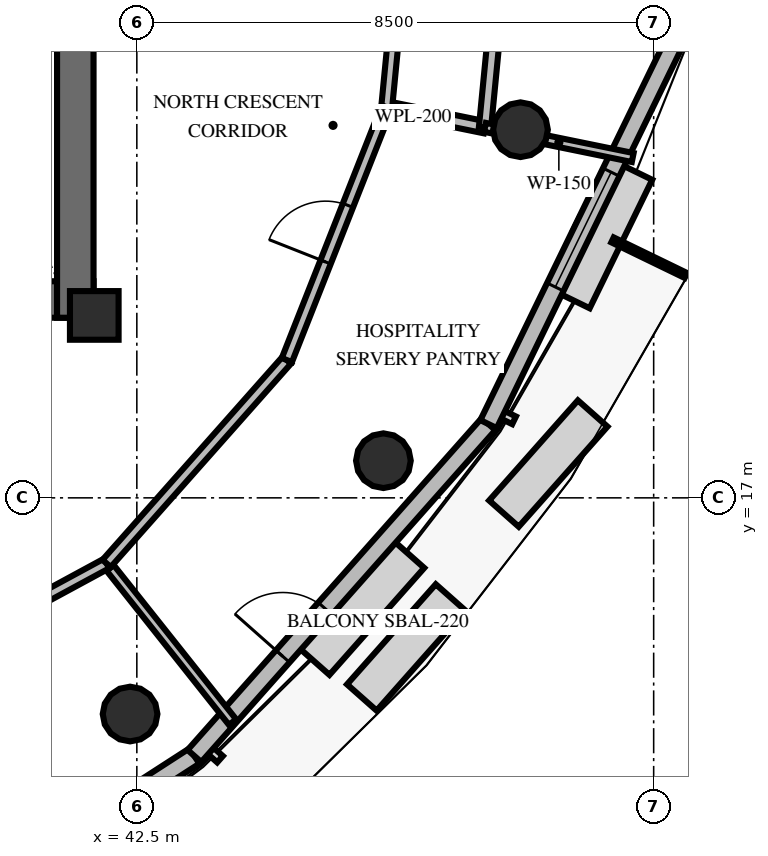
"""IFC4 building model, lengths in metres.
Left out: names, types, materials, properties, quantities, classifications, styles, units other than length and angle.
Written with IfcOpenShell. Run it as: python <this file> out.ifc"""

import sys

from ifc_helpers import new_model, si_unit, direction, frame, frame_2d, origin, origin_2d, place, context, subcontext, project, spatial, rectangle, circle, extrude, element, fill, save


model = new_model("IFC4")
c1 = context("Model", 3, precision=1e-05, world=origin(), true_north=direction((0.0, 1.0)))
c2 = subcontext(c1, "Body", "Model", "MODEL_VIEW")
j1 = project(units=[si_unit("LENGTHUNIT", "METRE"), si_unit("PLANEANGLEUNIT", "RADIAN")], contexts=[c1])
p1 = place(None, origin())
s1 = spatial("IfcSite", under=j1, at=p1, CompositionType="ELEMENT")
p2 = place(p1, origin())
s2 = spatial("IfcBuilding", under=s1, at=p2, CompositionType="ELEMENT")
p3 = place(p2, frame((0.0, 0.0, 234.0)))
s3 = spatial("IfcBuildingStorey", under=s2, at=p3, CompositionType="ELEMENT", Elevation=234.0)
p4 = place(p3, frame((26.222, 20.262, 0.0), z_axis=(0.0, 0.0, 1.0), x_axis=(1.0, 0.0, 0.0)))
e1 = element("IfcWall", 1, at=p4, inside=s3, PredefinedType="SHEAR", context=c2, shape_type="SweptSolid", body=[
    extrude(rectangle(XDim=15.566, YDim=0.6, at=frame_2d((7.783, 0.0))), origin(), (0.0, 0.0, 1.0), 3.6),
])
p5 = place(p3, frame((41.488, 19.962, 0.0), z_axis=(0.0, 0.0, 1.0), x_axis=(0.0, 1.0, 0.0)))
e2 = element("IfcWall", 2, at=p5, inside=s3, PredefinedType="SHEAR", context=c2, shape_type="SweptSolid", body=[
    extrude(rectangle(XDim=10.276, YDim=0.6, at=frame_2d((5.138, 0.0))), origin(), (0.0, 0.0, 1.0), 3.6),
])
p6 = place(p3, frame((41.8, 20.0, 0.0), z_axis=(0.0, 0.0, 1.0), x_axis=(1.0, 0.0, 0.0)))
e3 = element("IfcColumn", 3, at=p6, inside=s3, PredefinedType="PILASTER", context=c2, shape_type="SweptSolid", body=[
    extrude(rectangle(XDim=0.8, YDim=0.8, at=origin_2d()), origin(), (0.0, 0.0, 1.0), 3.6),
])
for number, where, z_axis, x_axis in (
    (4, (42.389, 13.445, 0.0), (0.0, 0.0, 1.0), (1.0, 0.0, 0.0)),
    (5, (46.555, 17.611, 0.0), (0.0, 0.0, 1.0), (1.0, 0.0, 0.0)),
    (6, (48.81, 23.054, 0.0), (0.0, 0.0, 1.0), (1.0, 0.0, 0.0)),
):
    element("IfcColumn", number, at=place(p3, frame(where, z_axis=z_axis, x_axis=x_axis)), inside=s3, PredefinedType="COLUMN", context=c2, shape_type="SweptSolid", body=[
        extrude(circle(Radius=0.45, at=origin_2d()), origin(), (0.0, 0.0, 1.0), 3.6),
    ])
p7 = place(p3, frame((37.47, 8.894, 0.0), z_axis=(0.0, 0.0, 1.0), x_axis=(0.840018200764, 0.542558220272, 0.0)))
e7 = element("IfcWall", 7, at=p7, inside=s3, PredefinedType="SOLIDWALL", context=c2, shape_type="SweptSolid", body=[
    extrude(rectangle(XDim=7.115, YDim=0.3, at=frame_2d((3.558, 0.0))), origin(), (0.0, 0.0, 1.0), 2.76),
])
p8 = place(p7, frame((2.508, 0.0, 0.8)))
e8 = element("IfcOpeningElement", 8, at=p8, cuts=e7, PredefinedType="OPENING", context=c2, shape_type="SweptSolid", body=[
    extrude(rectangle(XDim=2.1, YDim=1.85, at=frame_2d((1.05, 0.925))), frame((0.0, 0.16, 0.0), z_axis=(0.0, -1.0, 0.0), x_axis=(1.0, 0.0, 0.0)), (0.0, 0.0, 1.0), 0.32),
])
p9 = place(p3, frame((43.447, 12.754, 0.0), z_axis=(0.0, 0.0, 1.0), x_axis=(0.663261925143, 0.748387345333, 0.0)))
e9 = element("IfcWall", 9, at=p9, inside=s3, PredefinedType="SOLIDWALL", context=c2, shape_type="SweptSolid", body=[
    extrude(rectangle(XDim=7.293, YDim=0.3, at=frame_2d((3.647, 0.0))), origin(), (0.0, 0.0, 1.0), 2.76),
])
p10 = place(p9, frame((2.19, 0.0, 0.0)))
e10 = element("IfcOpeningElement", 10, at=p10, cuts=e9, PredefinedType="OPENING", context=c2, shape_type="SweptSolid", body=[
    extrude(rectangle(XDim=1.05, YDim=2.15, at=frame_2d((0.525, 1.075))), frame((0.0, 0.16, 0.0), z_axis=(0.0, -1.0, 0.0), x_axis=(1.0, 0.0, 0.0)), (0.0, 0.0, 1.0), 0.32),
])
p11 = place(p3, frame((48.284, 18.213, 0.0), z_axis=(0.0, 0.0, 1.0), x_axis=(0.437731914834, 0.899105539264, 0.0)))
e11 = element("IfcWall", 11, at=p11, inside=s3, PredefinedType="SOLIDWALL", context=c2, shape_type="SweptSolid", body=[
    extrude(rectangle(XDim=7.115, YDim=0.3, at=frame_2d((3.558, 0.0))), origin(), (0.0, 0.0, 1.0), 2.76),
])
p12 = place(p11, frame((2.508, 0.0, 0.8)))
e12 = element("IfcOpeningElement", 12, at=p12, cuts=e11, PredefinedType="OPENING", context=c2, shape_type="SweptSolid", body=[
    extrude(rectangle(XDim=2.1, YDim=1.85, at=frame_2d((1.05, 0.925))), frame((0.0, 0.16, 0.0), z_axis=(0.0, -1.0, 0.0), x_axis=(1.0, 0.0, 0.0)), (0.0, 0.0, 1.0), 0.32),
])
p13 = place(p3, frame((46.609, 23.423, 0.0), z_axis=(0.0, 0.0, 1.0), x_axis=(0.979758481416, -0.200183211319, 0.0)))
e13 = element("IfcWall", 13, at=p13, inside=s3, PredefinedType="PLUMBINGWALL", context=c2, shape_type="SweptSolid", body=[
    extrude(rectangle(XDim=1.65, YDim=0.2, at=frame_2d((0.825, 0.0))), origin(), (0.0, 0.0, 1.0), 2.46),
])
p14 = place(p3, frame((48.226, 23.093, 0.0), z_axis=(0.0, 0.0, 1.0), x_axis=(0.096676337661, 0.995315872342, 0.0)))
e14 = element("IfcWall", 14, at=p14, inside=s3, PredefinedType="PLUMBINGWALL", context=c2, shape_type="SweptSolid", body=[
    extrude(rectangle(XDim=3.035, YDim=0.2, at=frame_2d((1.518, 0.0))), origin(), (0.0, 0.0, 1.0), 2.46),
])
p15 = place(p3, frame((46.609, 23.423, 0.0), z_axis=(0.0, 0.0, 1.0), x_axis=(0.096727271829, 0.995310923724, 0.0)))
e15 = element("IfcWall", 15, at=p15, inside=s3, PredefinedType="PARTITIONING", context=c2, shape_type="SweptSolid", body=[
    extrude(rectangle(XDim=2.691, YDim=0.18, at=frame_2d((1.345, 0.0))), origin(), (0.0, 0.0, 1.0), 2.46),
])
p16 = place(p15, frame((1.167, 0.0, 0.0)))
e16 = element("IfcOpeningElement", 16, at=p16, cuts=e15, PredefinedType="OPENING", context=c2, shape_type="SweptSolid", body=[
    extrude(rectangle(XDim=0.92, YDim=2.1, at=frame_2d((0.46, 1.05))), frame((0.0, 0.1, 0.0), z_axis=(0.0, -1.0, 0.0), x_axis=(1.0, 0.0, 0.0)), (0.0, 0.0, 1.0), 0.2),
])
p17 = place(p3, frame((48.226, 23.093, 0.0), z_axis=(0.0, 0.0, 1.0), x_axis=(0.979742600156, -0.200260923396, 0.0)))
e17 = element("IfcWall", 17, at=p17, inside=s3, PredefinedType="PARTITIONING", context=c2, shape_type="SweptSolid", body=[
    extrude(rectangle(XDim=2.48, YDim=0.15, at=frame_2d((1.24, 0.0))), origin(), (0.0, 0.0, 1.0), 2.46),
])
p18 = place(p3, frame((42.003, 15.921, 0.0), z_axis=(0.0, 0.0, 1.0), x_axis=(0.62183058336, -0.783151789628, 0.0)))
e18 = element("IfcWall", 18, at=p18, inside=s3, PredefinedType="PARTITIONING", context=c2, shape_type="SweptSolid", body=[
    extrude(rectangle(XDim=3.331, YDim=0.15, at=frame_2d((1.666, 0.0))), origin(), (0.0, 0.0, 1.0), 2.46),
])
for number, where, z_axis, x_axis in (
    (19, (38.073, 13.792, 0.0), (0.0, 0.0, 1.0), (0.879, 0.476, 0.0)),
    (20, (42.003, 15.921, 0.0), (0.0, 0.0, 1.0), (0.663, 0.748, 0.0)),
):
    element("IfcWall", number, at=place(p3, frame(where, z_axis=z_axis, x_axis=x_axis)), inside=s3, PredefinedType="PARTITIONING", context=c2, shape_type="SweptSolid", body=[
        extrude(rectangle(XDim=4.47, YDim=0.18, at=frame_2d((2.235, 0.0))), origin(), (0.0, 0.0, 1.0), 2.46),
    ])
p19 = place(p3, frame((44.968, 19.266, 0.0), z_axis=(0.0, 0.0, 1.0), x_axis=(0.367328200365, 0.930091389712, 0.0)))
e21 = element("IfcWall", 21, at=p19, inside=s3, PredefinedType="PARTITIONING", context=c2, shape_type="SweptSolid", body=[
    extrude(rectangle(XDim=4.47, YDim=0.18, at=frame_2d((2.235, 0.0))), origin(), (0.0, 0.0, 1.0), 2.46),
])
p20 = place(p19, frame((1.735, 0.0, 0.0)))
e22 = element("IfcOpeningElement", 22, at=p20, cuts=e21, PredefinedType="OPENING", context=c2, shape_type="SweptSolid", body=[
    extrude(rectangle(XDim=1.0, YDim=2.15, at=frame_2d((0.5, 1.075))), frame((0.0, 0.1, 0.0), z_axis=(0.0, -1.0, 0.0), x_axis=(1.0, 0.0, 0.0)), (0.0, 0.0, 1.0), 0.2),
])
p21 = place(p10, origin())
e23 = element("IfcDoor", 23, at=p21, inside=s3, OperationType="SINGLE_SWING_LEFT", PredefinedType="DOOR", context=c2, shape_type="SweptSolid", body=[
    extrude(rectangle(XDim=1.05, YDim=2.15, at=frame_2d((0.525, 1.075))), frame((0.0, 0.025, 0.0), z_axis=(0.0, -1.0, 0.0), x_axis=(1.0, 0.0, 0.0)), (0.0, 0.0, 1.0), 0.05),
])
fill(e10, e23)
p22 = place(p12, origin())
e24 = element("IfcWindow", 24, at=p22, inside=s3, PartitioningType="SINGLE_PANEL", PredefinedType="WINDOW", context=c2, shape_type="SweptSolid", body=[
    extrude(rectangle(XDim=2.1, YDim=1.85, at=frame_2d((1.05, 0.925))), frame((0.0, 0.03, 0.0), z_axis=(0.0, -1.0, 0.0), x_axis=(1.0, 0.0, 0.0)), (0.0, 0.0, 1.0), 0.06),
])
fill(e12, e24)
p23 = place(p20, origin())
e25 = element("IfcDoor", 25, at=p23, inside=s3, OperationType="SINGLE_SWING_LEFT", PredefinedType="DOOR", context=c2, shape_type="SweptSolid", body=[
    extrude(rectangle(XDim=1.0, YDim=2.15, at=frame_2d((0.5, 1.075))), frame((0.0, 0.025, 0.0), z_axis=(0.0, -1.0, 0.0), x_axis=(1.0, 0.0, 0.0)), (0.0, 0.0, 1.0), 0.05),
])
fill(e22, e25)
save(model, sys.argv[1])
